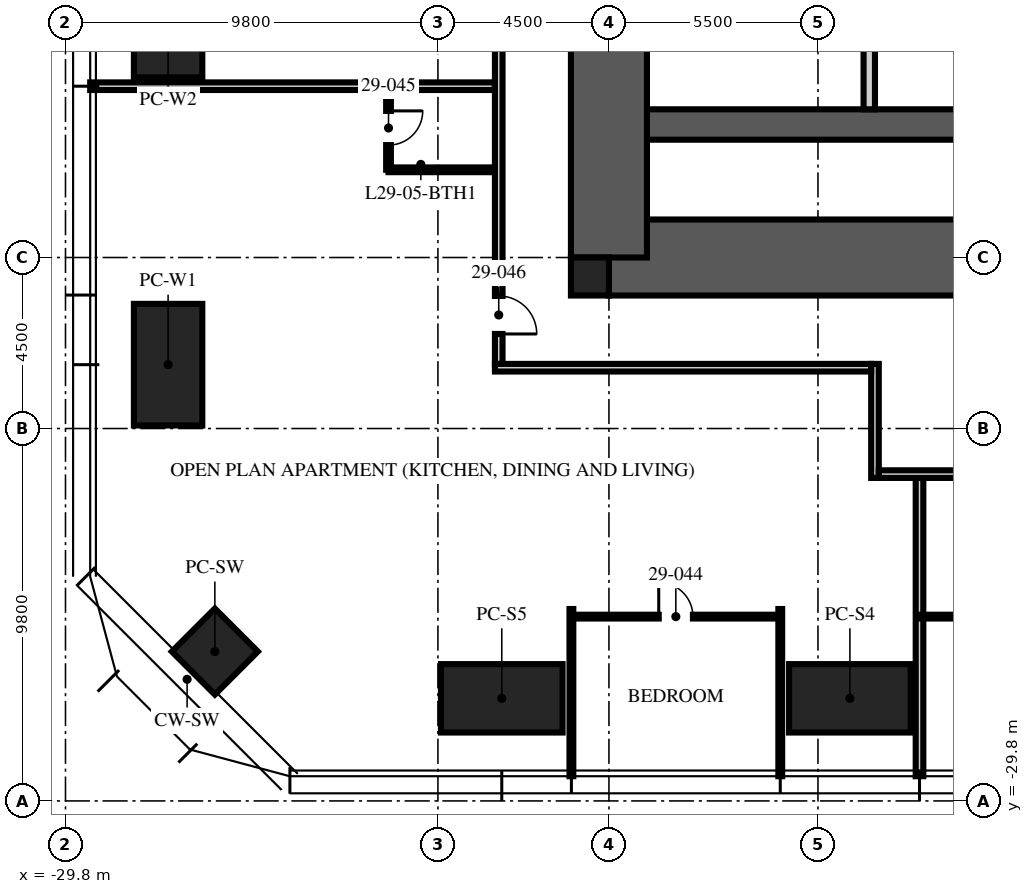
"""IFC4 building model, lengths in metres.
Left out: names, types, materials, properties, quantities, classifications, styles, units other than length and angle.
Written with IfcOpenShell. Run it as: python <this file> out.ifc"""

import sys

from ifc_helpers import new_model, si_unit, direction, frame, frame_2d, origin, origin_2d, place, context, subcontext, project, spatial, rectangle, hollow_rectangle, extrude, element, fill, save


model = new_model("IFC4")
c1 = context("Model", 3, precision=1e-05, world=origin(), true_north=direction((0.0, 1.0)))
c2 = subcontext(c1, "Body", "Model", "MODEL_VIEW")
j1 = project(units=[si_unit("LENGTHUNIT", "METRE"), si_unit("PLANEANGLEUNIT", "RADIAN")], contexts=[c1])
p1 = place(None, origin())
s1 = spatial("IfcSite", under=j1, at=p1, CompositionType="ELEMENT")
p2 = place(p1, origin())
s2 = spatial("IfcBuilding", under=s1, at=p2, CompositionType="ELEMENT")
p3 = place(p2, frame((0.0, 0.0, 118.5)))
s3 = spatial("IfcBuildingStorey", under=s2, at=p3, CompositionType="ELEMENT", Elevation=118.5)
p4 = place(p3, frame((-15.5, -15.5, -0.25), z_axis=(0.0, 0.0, 1.0), x_axis=(1.0, 0.0, 0.0)))
e1 = element("IfcWall", 1, at=p4, inside=s3, PredefinedType="SHEAR", context=c2, shape_type="SweptSolid", body=[
    extrude(rectangle(XDim=31.0, YDim=2.0, at=frame_2d((15.5, 0.0))), origin(), (0.0, 0.0, 1.0), 3.75),
])
p5 = place(p4, frame((10.4, 0.0, 0.25)))
e2 = element("IfcOpeningElement", 2, at=p5, cuts=e1, PredefinedType="OPENING", context=c2, shape_type="SweptSolid", body=[
    extrude(rectangle(XDim=1.1, YDim=2.1, at=frame_2d((0.55, 1.05))), frame((0.0, 1.01, 0.0), z_axis=(0.0, -1.0, 0.0), x_axis=(1.0, 0.0, 0.0)), (0.0, 0.0, 1.0), 2.02),
])
p6 = place(p4, frame((13.5, 0.0, 0.25)))
e3 = element("IfcOpeningElement", 3, at=p6, cuts=e1, PredefinedType="OPENING", context=c2, shape_type="SweptSolid", body=[
    extrude(rectangle(XDim=1.1, YDim=2.1, at=frame_2d((0.55, 1.05))), frame((0.0, 1.01, 0.0), z_axis=(0.0, -1.0, 0.0), x_axis=(1.0, 0.0, 0.0)), (0.0, 0.0, 1.0), 2.02),
])
p7 = place(p4, frame((16.6, 0.0, 0.25)))
e4 = element("IfcOpeningElement", 4, at=p7, cuts=e1, PredefinedType="OPENING", context=c2, shape_type="SweptSolid", body=[
    extrude(rectangle(XDim=1.1, YDim=2.1, at=frame_2d((0.55, 1.05))), frame((0.0, 1.01, 0.0), z_axis=(0.0, -1.0, 0.0), x_axis=(1.0, 0.0, 0.0)), (0.0, 0.0, 1.0), 2.02),
])
p8 = place(p3, frame((-15.5, -12.0, -0.25), z_axis=(0.0, 0.0, 1.0), x_axis=(1.0, 0.0, 0.0)))
e5 = element("IfcWall", 5, at=p8, inside=s3, PredefinedType="SHEAR", context=c2, shape_type="SweptSolid", body=[
    extrude(rectangle(XDim=31.0, YDim=0.8, at=frame_2d((15.5, 0.0))), origin(), (0.0, 0.0, 1.0), 3.75),
])
p9 = place(p3, frame((-15.5, -15.5, -0.25), z_axis=(0.0, 0.0, 1.0), x_axis=(0.0, 1.0, 0.0)))
e6 = element("IfcWall", 6, at=p9, inside=s3, PredefinedType="SHEAR", context=c2, shape_type="SweptSolid", body=[
    extrude(rectangle(XDim=31.0, YDim=2.0, at=frame_2d((15.5, 0.0))), origin(), (0.0, 0.0, 1.0), 3.75),
])
p10 = place(p9, frame((6.5, 0.0, 0.25)))
e7 = element("IfcOpeningElement", 7, at=p10, cuts=e6, PredefinedType="OPENING", context=c2, shape_type="SweptSolid", body=[
    extrude(rectangle(XDim=1.2, YDim=2.1, at=frame_2d((0.6, 1.05))), frame((0.0, 1.01, 0.0), z_axis=(0.0, -1.0, 0.0), x_axis=(1.0, 0.0, 0.0)), (0.0, 0.0, 1.0), 2.02),
])
p11 = place(p9, frame((23.0, 0.0, 0.25)))
e8 = element("IfcOpeningElement", 8, at=p11, cuts=e6, PredefinedType="OPENING", context=c2, shape_type="SweptSolid", body=[
    extrude(rectangle(XDim=1.8, YDim=2.1, at=frame_2d((0.9, 1.05))), frame((0.0, 1.01, 0.0), z_axis=(0.0, -1.0, 0.0), x_axis=(1.0, 0.0, 0.0)), (0.0, 0.0, 1.0), 2.02),
])
p12 = place(p3, frame((-16.0, -16.0, -0.25), z_axis=(0.0, 0.0, 1.0), x_axis=(1.0, 0.0, 0.0)))
e9 = element("IfcColumn", 9, at=p12, inside=s3, PredefinedType="COLUMN", context=c2, shape_type="SweptSolid", body=[
    extrude(rectangle(XDim=1.0, YDim=1.0, at=origin_2d()), origin(), (0.0, 0.0, 1.0), 3.75),
])
for number, where, z_axis, x_axis in (
    (10, (-9.16, -27.1, 0.0), (0.0, 0.0, 1.0), (1.0, 0.0, 0.0)),
    (11, (-18.32, -27.1, 0.0), (0.0, 0.0, 1.0), (1.0, 0.0, 0.0)),
    (12, (-27.1, -18.32, 0.0), (0.0, 0.0, 1.0), (0.0, 1.0, 0.0)),
    (13, (-27.1, -9.16, 0.0), (0.0, 0.0, 1.0), (0.0, 1.0, 0.0)),
):
    element("IfcColumn", number, at=place(p3, frame(where, z_axis=z_axis, x_axis=x_axis)), inside=s3, PredefinedType="COLUMN", context=c2, shape_type="SweptSolid", body=[
        extrude(hollow_rectangle(XDim=3.2, YDim=1.8, WallThickness=0.2, at=origin_2d()), origin(), (0.0, 0.0, 1.0), 3.75),
    ])
p13 = place(p3, frame((-25.87, -25.87, 0.0), z_axis=(0.0, 0.0, 1.0), x_axis=(0.707106781187, -0.707106781187, 0.0)))
e14 = element("IfcColumn", 14, at=p13, inside=s3, PredefinedType="COLUMN", context=c2, shape_type="SweptSolid", body=[
    extrude(hollow_rectangle(XDim=1.6, YDim=1.6, WallThickness=0.1, at=origin_2d()), origin(), (0.0, 0.0, 1.0), 3.75),
])
p14 = place(p3, frame((-8.65, -11.6, 0.0), z_axis=(0.0, 0.0, 1.0), x_axis=(0.0, 1.0, 0.0)))
e15 = element("IfcWall", 15, at=p14, inside=s3, PredefinedType="PARTITIONING", context=c2, shape_type="SweptSolid", body=[
    extrude(rectangle(XDim=6.7, YDim=0.3, at=frame_2d((3.35, 0.0))), origin(), (0.0, 0.0, 1.0), 3.5),
])
p15 = place(p14, frame((2.85, 0.0, 0.0)))
e16 = element("IfcOpeningElement", 16, at=p15, cuts=e15, PredefinedType="OPENING", context=c2, shape_type="SweptSolid", body=[
    extrude(rectangle(XDim=1.1, YDim=2.1, at=frame_2d((0.55, 1.05))), frame((0.0, 0.16, 0.0), z_axis=(0.0, -1.0, 0.0), x_axis=(1.0, 0.0, 0.0)), (0.0, 0.0, 1.0), 0.32),
])
p16 = place(p3, frame((-18.5, -10.992, 0.0), z_axis=(0.0, 0.0, 1.0), x_axis=(-1.0, 0.0, 0.0)))
e17 = element("IfcWall", 17, at=p16, inside=s3, PredefinedType="PARTITIONING", context=c2, shape_type="SweptSolid", body=[
    extrude(rectangle(XDim=10.65, YDim=0.2, at=frame_2d((5.325, 0.0))), origin(), (0.0, 0.0, 1.0), 2.81),
])
for number, where, z_axis, x_axis in (
    (18, (-16.488, -24.75, 0.0), (0.0, 0.0, 1.0), (0.0, -1.0, 0.0)),
    (19, (-10.992, -24.75, 0.0), (0.0, 0.0, 1.0), (0.0, -1.0, 0.0)),
):
    element("IfcWall", number, at=place(p3, frame(where, z_axis=z_axis, x_axis=x_axis)), inside=s3, PredefinedType="PARTITIONING", context=c2, shape_type="SweptSolid", body=[
        extrude(rectangle(XDim=4.4, YDim=0.1, at=frame_2d((2.2, 0.0))), origin(), (0.0, 0.0, 1.0), 2.81),
    ])
p17 = place(p3, frame((-7.328, -21.3, 0.0), z_axis=(0.0, 0.0, 1.0), x_axis=(0.0, -1.0, 0.0)))
e20 = element("IfcWall", 20, at=p17, inside=s3, PredefinedType="PARTITIONING", context=c2, shape_type="SweptSolid", body=[
    extrude(rectangle(XDim=7.85, YDim=0.2, at=frame_2d((3.925, 0.0))), origin(), (0.0, 0.0, 1.0), 2.81),
])
p18 = place(p3, frame((-16.488, -24.95, 0.0), z_axis=(0.0, 0.0, 1.0), x_axis=(1.0, 0.0, 0.0)))
e21 = element("IfcWall", 21, at=p18, inside=s3, PredefinedType="PARTITIONING", context=c2, shape_type="SweptSolid", body=[
    extrude(rectangle(XDim=5.496, YDim=0.1, at=frame_2d((2.748, 0.0))), origin(), (0.0, 0.0, 1.0), 2.81),
])
p19 = place(p18, frame((2.298, 0.0, 0.0)))
e22 = element("IfcOpeningElement", 22, at=p19, cuts=e21, PredefinedType="OPENING", context=c2, shape_type="SweptSolid", body=[
    extrude(rectangle(XDim=0.9, YDim=2.1, at=frame_2d((0.45, 1.05))), frame((0.0, 0.06, 0.0), z_axis=(0.0, -1.0, 0.0), x_axis=(1.0, 0.0, 0.0)), (0.0, 0.0, 1.0), 0.12),
])
p20 = place(p3, frame((-21.3, -10.992, 0.0), z_axis=(0.0, 0.0, 1.0), x_axis=(0.0, -1.0, 0.0)))
e23 = element("IfcWall", 23, at=p20, inside=s3, PredefinedType="PARTITIONING", context=c2, shape_type="SweptSolid", body=[
    extrude(rectangle(XDim=2.2, YDim=0.125, at=frame_2d((1.1, 0.0))), origin(), (0.0, 0.0, 1.0), 3.5),
])
p21 = place(p20, frame((0.65, 0.0, 0.0)))
e24 = element("IfcOpeningElement", 24, at=p21, cuts=e23, PredefinedType="OPENING", context=c2, shape_type="SweptSolid", body=[
    extrude(rectangle(XDim=0.9, YDim=2.1, at=frame_2d((0.45, 1.05))), frame((0.0, 0.073, 0.0), z_axis=(0.0, -1.0, 0.0), x_axis=(1.0, 0.0, 0.0)), (0.0, 0.0, 1.0), 0.145),
])
p22 = place(p3, frame((-18.5, -13.192, 0.0), z_axis=(0.0, 0.0, 1.0), x_axis=(-1.0, 0.0, 0.0)))
e25 = element("IfcWall", 25, at=p22, inside=s3, PredefinedType="PARTITIONING", context=c2, shape_type="SweptSolid", body=[
    extrude(rectangle(XDim=2.8, YDim=0.125, at=frame_2d((1.4, 0.0))), origin(), (0.0, 0.0, 1.0), 3.5),
])
p23 = place(p3, frame((-7.328, -24.95, 0.0), z_axis=(0.0, 0.0, 1.0), x_axis=(1.0, 0.0, 0.0)))
e26 = element("IfcWall", 26, at=p23, inside=s3, PredefinedType="PARTITIONING", context=c2, shape_type="SweptSolid", body=[
    extrude(rectangle(XDim=5.496, YDim=0.1, at=frame_2d((2.748, 0.0))), origin(), (0.0, 0.0, 1.0), 2.81),
])
p24 = place(p23, frame((2.298, 0.0, 0.0)))
e27 = element("IfcOpeningElement", 27, at=p24, cuts=e26, PredefinedType="OPENING", context=c2, shape_type="SweptSolid", body=[
    extrude(rectangle(XDim=0.9, YDim=2.1, at=frame_2d((0.45, 1.05))), frame((0.0, 0.06, 0.0), z_axis=(0.0, -1.0, 0.0), x_axis=(1.0, 0.0, 0.0)), (0.0, 0.0, 1.0), 0.12),
])
p25 = place(p3, frame((-18.4, 5.328, 0.0), z_axis=(0.0, 0.0, 1.0), x_axis=(0.0, -1.0, 0.0)))
e28 = element("IfcWall", 28, at=p25, inside=s3, PredefinedType="PARTITIONING", context=c2, shape_type="SweptSolid", body=[
    extrude(rectangle(XDim=23.628, YDim=0.2, at=frame_2d((11.814, 0.0))), origin(), (0.0, 0.0, 1.0), 2.3),
])
p26 = place(p25, frame((21.84, 0.0, 0.0)))
e29 = element("IfcOpeningElement", 29, at=p26, cuts=e28, PredefinedType="OPENING", context=c2, shape_type="SweptSolid", body=[
    extrude(rectangle(XDim=1.0, YDim=2.2, at=frame_2d((0.5, 1.1))), frame((0.0, 0.11, 0.0), z_axis=(0.0, -1.0, 0.0), x_axis=(1.0, 0.0, 0.0)), (0.0, 0.0, 1.0), 0.22),
])
p27 = place(p3, frame((-8.5, -18.3, 0.0), z_axis=(0.0, 0.0, 1.0), x_axis=(0.0, -1.0, 0.0)))
e30 = element("IfcWall", 30, at=p27, inside=s3, PredefinedType="PARTITIONING", context=c2, shape_type="SweptSolid", body=[
    extrude(rectangle(XDim=3.0, YDim=0.2, at=frame_2d((1.5, 0.0))), origin(), (0.0, 0.0, 1.0), 3.5),
])
p28 = place(p3, frame((5.4, -21.2, 0.0), z_axis=(0.0, 0.0, 1.0), x_axis=(-1.0, 0.0, 0.0)))
e31 = element("IfcWall", 31, at=p28, inside=s3, PredefinedType="PARTITIONING", context=c2, shape_type="SweptSolid", body=[
    extrude(rectangle(XDim=13.8, YDim=0.2, at=frame_2d((6.9, 0.0))), origin(), (0.0, 0.0, 1.0), 2.7),
])
p29 = place(p3, frame((-8.6, -18.4, 0.0), z_axis=(0.0, 0.0, 1.0), x_axis=(-1.0, 0.0, 0.0)))
e32 = element("IfcWall", 32, at=p29, inside=s3, PredefinedType="PARTITIONING", context=c2, shape_type="SweptSolid", body=[
    extrude(rectangle(XDim=9.9, YDim=0.2, at=frame_2d((4.95, 0.0))), origin(), (0.0, 0.0, 1.0), 2.3),
])
p30 = place(p19, origin())
e33 = element("IfcDoor", 33, at=p30, inside=s3, OperationType="SINGLE_SWING_LEFT", PredefinedType="DOOR", context=c2, shape_type="SweptSolid", body=[
    extrude(rectangle(XDim=0.9, YDim=2.1, at=frame_2d((0.45, 1.05))), frame((0.0, 0.025, 0.0), z_axis=(0.0, -1.0, 0.0), x_axis=(1.0, 0.0, 0.0)), (0.0, 0.0, 1.0), 0.05),
])
fill(e22, e33)
p31 = place(p21, origin())
e34 = element("IfcDoor", 34, at=p31, inside=s3, OperationType="SINGLE_SWING_LEFT", PredefinedType="DOOR", context=c2, shape_type="SweptSolid", body=[
    extrude(rectangle(XDim=0.9, YDim=2.1, at=frame_2d((0.45, 1.05))), frame((0.0, 0.025, 0.0), z_axis=(0.0, -1.0, 0.0), x_axis=(1.0, 0.0, 0.0)), (0.0, 0.0, 1.0), 0.05),
])
fill(e24, e34)
p32 = place(p26, origin())
e35 = element("IfcDoor", 35, at=p32, inside=s3, OperationType="SINGLE_SWING_RIGHT", PredefinedType="DOOR", context=c2, shape_type="SweptSolid", body=[
    extrude(rectangle(XDim=1.0, YDim=2.2, at=frame_2d((0.5, 1.1))), frame((0.0, 0.025, 0.0), z_axis=(0.0, -1.0, 0.0), x_axis=(1.0, 0.0, 0.0)), (0.0, 0.0, 1.0), 0.05),
])
fill(e29, e35)
save(model, sys.argv[1])
